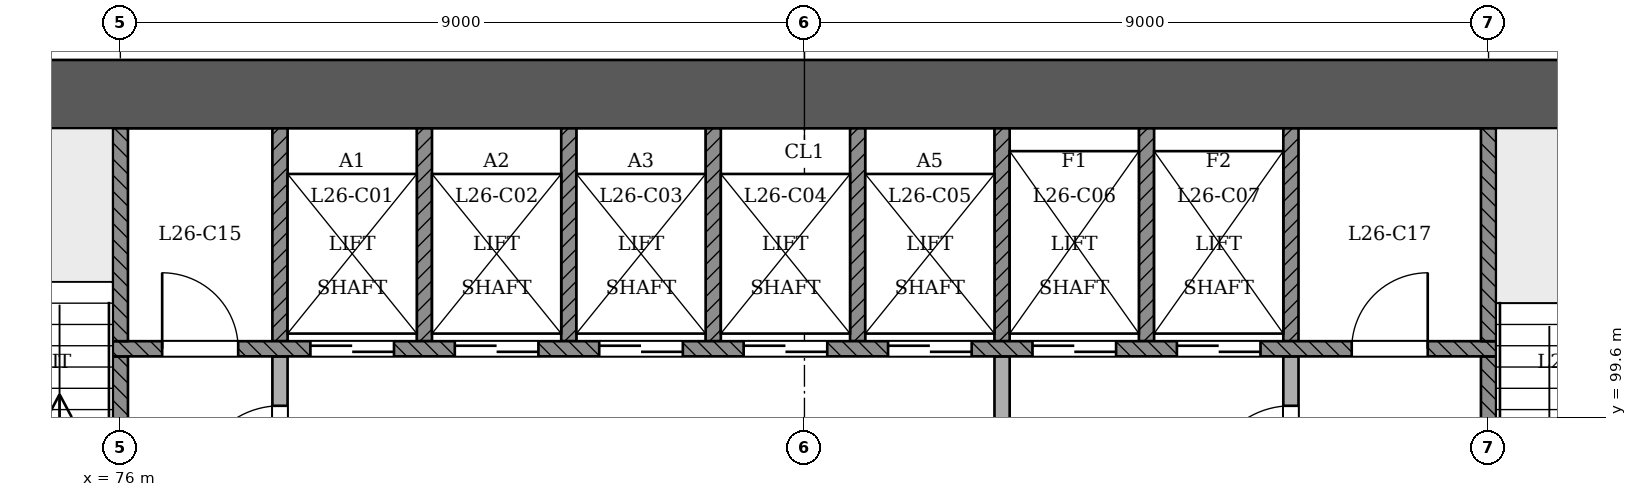
"""IFC4 building model, lengths in metres.
Left out: names, types, materials, properties, quantities, classifications, styles, units other than length and angle.
Written with IfcOpenShell. Run it as: python <this file> out.ifc"""

import sys

from ifc_helpers import new_model, si_unit, direction, frame, frame_2d, origin, place, context, subcontext, project, spatial, rectangle, extrude, element, fill, save


model = new_model("IFC4")
c1 = context("Model", 3, precision=1e-05, world=origin(), true_north=direction((0.0, 1.0)))
c2 = subcontext(c1, "Body", "Model", "MODEL_VIEW")
j1 = project(units=[si_unit("LENGTHUNIT", "METRE"), si_unit("PLANEANGLEUNIT", "RADIAN")], contexts=[c1])
p1 = place(None, origin())
s1 = spatial("IfcSite", under=j1, at=p1, CompositionType="ELEMENT")
p2 = place(p1, origin())
s2 = spatial("IfcBuilding", under=s1, at=p2, CompositionType="ELEMENT")
p3 = place(p2, frame((0.0, 0.0, 104.4)))
s3 = spatial("IfcBuildingStorey", under=s2, at=p3, CompositionType="ELEMENT", Elevation=104.4)
p4 = place(p3, frame((97.45, 103.85, 0.0), z_axis=(0.0, 0.0, 1.0), x_axis=(-1.0, 0.0, 0.0)))
e1 = element("IfcWall", 1, at=p4, inside=s3, PredefinedType="SHEAR", context=c2, shape_type="SweptSolid", body=[
    extrude(rectangle(XDim=25.35, YDim=0.9, at=frame_2d((12.675, 0.0))), origin(), (0.0, 0.0, 1.0), 3.6),
])
p5 = place(p3, frame((87.6, 93.4, 0.0), z_axis=(0.0, 0.0, 1.0), x_axis=(0.0, 1.0, 0.0)))
e2 = element("IfcWall", 2, at=p5, inside=s3, PredefinedType="PARTITIONING", context=c2, shape_type="SweptSolid", body=[
    extrude(rectangle(XDim=7.0, YDim=0.2, at=frame_2d((3.5, 0.0))), origin(), (0.0, 0.0, 1.0), 3.1),
])
p6 = place(p5, frame((4.45, 0.0, 0.0)))
e3 = element("IfcOpeningElement", 3, at=p6, cuts=e2, PredefinedType="OPENING", context=c2, shape_type="SweptSolid", body=[
    extrude(rectangle(XDim=1.1, YDim=2.1, at=frame_2d((0.55, 1.05))), frame((0.0, 0.11, 0.0), z_axis=(0.0, -1.0, 0.0), x_axis=(1.0, 0.0, 0.0)), (0.0, 0.0, 1.0), 0.221),
])
p7 = place(p3, frame((91.4, 96.2, 0.0), z_axis=(0.0, 0.0, 1.0), x_axis=(0.0, 1.0, 0.0)))
e4 = element("IfcWall", 4, at=p7, inside=s3, PredefinedType="PARTITIONING", context=c2, shape_type="SweptSolid", body=[
    extrude(rectangle(XDim=4.2, YDim=0.2, at=frame_2d((2.1, 0.0))), origin(), (0.0, 0.0, 1.0), 3.1),
])
p8 = place(p7, frame((2.45, 0.0, 0.0)))
e5 = element("IfcOpeningElement", 5, at=p8, cuts=e4, PredefinedType="OPENING", context=c2, shape_type="SweptSolid", body=[
    extrude(rectangle(XDim=1.1, YDim=2.1, at=frame_2d((0.55, 1.05))), frame((0.0, 0.11, 0.0), z_axis=(0.0, -1.0, 0.0), x_axis=(1.0, 0.0, 0.0)), (0.0, 0.0, 1.0), 0.221),
])
p9 = place(p3, frame((76.0, 96.7, 0.0), z_axis=(0.0, 0.0, 1.0), x_axis=(0.0, 1.0, 0.0)))
e6 = element("IfcWall", 6, at=p9, inside=s3, PredefinedType="SOLIDWALL", context=c2, shape_type="SweptSolid", body=[
    extrude(rectangle(XDim=3.7, YDim=0.2, at=frame_2d((1.85, 0.0))), origin(), (0.0, 0.0, 1.0), 3.1),
])
p10 = place(p9, frame((0.35, 0.0, 0.0)))
e7 = element("IfcOpeningElement", 7, at=p10, cuts=e6, PredefinedType="OPENING", context=c2, shape_type="SweptSolid", body=[
    extrude(rectangle(XDim=1.1, YDim=2.1, at=frame_2d((0.55, 1.05))), frame((0.0, 0.11, 0.0), z_axis=(0.0, -1.0, 0.0), x_axis=(1.0, 0.0, 0.0)), (0.0, 0.0, 1.0), 0.221),
])
p11 = place(p3, frame((78.1, 96.7, 0.0), z_axis=(0.0, 0.0, 1.0), x_axis=(0.0, 1.0, 0.0)))
e8 = element("IfcWall", 8, at=p11, inside=s3, PredefinedType="PARTITIONING", context=c2, shape_type="SweptSolid", body=[
    extrude(rectangle(XDim=3.7, YDim=0.2, at=frame_2d((1.85, 0.0))), origin(), (0.0, 0.0, 1.0), 3.1),
])
p12 = place(p11, frame((1.95, 0.0, 0.0)))
e9 = element("IfcOpeningElement", 9, at=p12, cuts=e8, PredefinedType="OPENING", context=c2, shape_type="SweptSolid", body=[
    extrude(rectangle(XDim=1.1, YDim=2.1, at=frame_2d((0.55, 1.05))), frame((0.0, 0.11, 0.0), z_axis=(0.0, -1.0, 0.0), x_axis=(1.0, 0.0, 0.0)), (0.0, 0.0, 1.0), 0.221),
])
p13 = place(p3, frame((94.0, 96.7, 0.0), z_axis=(0.0, 0.0, 1.0), x_axis=(0.0, 1.0, 0.0)))
e10 = element("IfcWall", 10, at=p13, inside=s3, PredefinedType="SOLIDWALL", context=c2, shape_type="SweptSolid", body=[
    extrude(rectangle(XDim=3.7, YDim=0.2, at=frame_2d((1.85, 0.0))), origin(), (0.0, 0.0, 1.0), 3.1),
])
p14 = place(p13, frame((0.35, 0.0, 0.0)))
e11 = element("IfcOpeningElement", 11, at=p14, cuts=e10, PredefinedType="OPENING", context=c2, shape_type="SweptSolid", body=[
    extrude(rectangle(XDim=1.1, YDim=2.1, at=frame_2d((0.55, 1.05))), frame((0.0, 0.11, 0.0), z_axis=(0.0, -1.0, 0.0), x_axis=(1.0, 0.0, 0.0)), (0.0, 0.0, 1.0), 0.221),
])
p15 = place(p3, frame((75.9, 100.5, 0.0), z_axis=(0.0, 0.0, 1.0), x_axis=(1.0, 0.0, 0.0)))
e12 = element("IfcWall", 12, at=p15, inside=s3, PredefinedType="SOLIDWALL", context=c2, shape_type="SweptSolid", body=[
    extrude(rectangle(XDim=18.2, YDim=0.2, at=frame_2d((9.1, 0.0))), origin(), (0.0, 0.0, 1.0), 3.1),
])
p16 = place(p15, frame((2.6, 0.0, 0.0)))
e13 = element("IfcOpeningElement", 13, at=p16, cuts=e12, PredefinedType="OPENING", context=c2, shape_type="SweptSolid", body=[
    extrude(rectangle(XDim=1.1, YDim=2.1, at=frame_2d((0.55, 1.05))), frame((0.0, 0.11, 0.0), z_axis=(0.0, -1.0, 0.0), x_axis=(1.0, 0.0, 0.0)), (0.0, 0.0, 1.0), 0.221),
])
p17 = place(p15, frame((4.5, 0.0, 0.0)))
e14 = element("IfcOpeningElement", 14, at=p17, cuts=e12, PredefinedType="OPENING", context=c2, shape_type="SweptSolid", body=[
    extrude(rectangle(XDim=1.1, YDim=2.1, at=frame_2d((0.55, 1.05))), frame((0.0, 0.11, 0.0), z_axis=(0.0, -1.0, 0.0), x_axis=(1.0, 0.0, 0.0)), (0.0, 0.0, 1.0), 0.221),
])
p18 = place(p15, frame((6.4, 0.0, 0.0)))
e15 = element("IfcOpeningElement", 15, at=p18, cuts=e12, PredefinedType="OPENING", context=c2, shape_type="SweptSolid", body=[
    extrude(rectangle(XDim=1.1, YDim=2.1, at=frame_2d((0.55, 1.05))), frame((0.0, 0.11, 0.0), z_axis=(0.0, -1.0, 0.0), x_axis=(1.0, 0.0, 0.0)), (0.0, 0.0, 1.0), 0.221),
])
p19 = place(p15, frame((8.3, 0.0, 0.0)))
e16 = element("IfcOpeningElement", 16, at=p19, cuts=e12, PredefinedType="OPENING", context=c2, shape_type="SweptSolid", body=[
    extrude(rectangle(XDim=1.1, YDim=2.1, at=frame_2d((0.55, 1.05))), frame((0.0, 0.11, 0.0), z_axis=(0.0, -1.0, 0.0), x_axis=(1.0, 0.0, 0.0)), (0.0, 0.0, 1.0), 0.221),
])
p20 = place(p15, frame((10.2, 0.0, 0.0)))
e17 = element("IfcOpeningElement", 17, at=p20, cuts=e12, PredefinedType="OPENING", context=c2, shape_type="SweptSolid", body=[
    extrude(rectangle(XDim=1.1, YDim=2.1, at=frame_2d((0.55, 1.05))), frame((0.0, 0.11, 0.0), z_axis=(0.0, -1.0, 0.0), x_axis=(1.0, 0.0, 0.0)), (0.0, 0.0, 1.0), 0.221),
])
p21 = place(p15, frame((12.1, 0.0, 0.0)))
e18 = element("IfcOpeningElement", 18, at=p21, cuts=e12, PredefinedType="OPENING", context=c2, shape_type="SweptSolid", body=[
    extrude(rectangle(XDim=1.1, YDim=2.1, at=frame_2d((0.55, 1.05))), frame((0.0, 0.11, 0.0), z_axis=(0.0, -1.0, 0.0), x_axis=(1.0, 0.0, 0.0)), (0.0, 0.0, 1.0), 0.221),
])
p22 = place(p15, frame((14.0, 0.0, 0.0)))
e19 = element("IfcOpeningElement", 19, at=p22, cuts=e12, PredefinedType="OPENING", context=c2, shape_type="SweptSolid", body=[
    extrude(rectangle(XDim=1.1, YDim=2.1, at=frame_2d((0.55, 1.05))), frame((0.0, 0.11, 0.0), z_axis=(0.0, -1.0, 0.0), x_axis=(1.0, 0.0, 0.0)), (0.0, 0.0, 1.0), 0.221),
])
p23 = place(p15, frame((0.65, 0.0, 0.0)))
e20 = element("IfcOpeningElement", 20, at=p23, cuts=e12, PredefinedType="OPENING", context=c2, shape_type="SweptSolid", body=[
    extrude(rectangle(XDim=1.0, YDim=2.1, at=frame_2d((0.5, 1.05))), frame((0.0, 0.11, 0.0), z_axis=(0.0, -1.0, 0.0), x_axis=(1.0, 0.0, 0.0)), (0.0, 0.0, 1.0), 0.221),
])
p24 = place(p15, frame((16.3, 0.0, 0.0)))
e21 = element("IfcOpeningElement", 21, at=p24, cuts=e12, PredefinedType="OPENING", context=c2, shape_type="SweptSolid", body=[
    extrude(rectangle(XDim=1.0, YDim=2.1, at=frame_2d((0.5, 1.05))), frame((0.0, 0.11, 0.0), z_axis=(0.0, -1.0, 0.0), x_axis=(1.0, 0.0, 0.0)), (0.0, 0.0, 1.0), 0.221),
])
for number, where, z_axis, x_axis in (
    (22, (76.0, 100.6, 0.0), (0.0, 0.0, 1.0), (0.0, 1.0, 0.0)),
    (23, (78.1, 100.6, 0.0), (0.0, 0.0, 1.0), (0.0, 1.0, 0.0)),
    (24, (80.0, 100.6, 0.0), (0.0, 0.0, 1.0), (0.0, 1.0, 0.0)),
    (25, (81.9, 100.6, 0.0), (0.0, 0.0, 1.0), (0.0, 1.0, 0.0)),
    (26, (83.8, 100.6, 0.0), (0.0, 0.0, 1.0), (0.0, 1.0, 0.0)),
    (27, (85.7, 100.6, 0.0), (0.0, 0.0, 1.0), (0.0, 1.0, 0.0)),
    (28, (87.6, 100.6, 0.0), (0.0, 0.0, 1.0), (0.0, 1.0, 0.0)),
    (29, (89.5, 100.6, 0.0), (0.0, 0.0, 1.0), (0.0, 1.0, 0.0)),
    (30, (91.4, 100.6, 0.0), (0.0, 0.0, 1.0), (0.0, 1.0, 0.0)),
    (31, (94.0, 100.6, 0.0), (0.0, 0.0, 1.0), (0.0, 1.0, 0.0)),
):
    element("IfcWall", number, at=place(p3, frame(where, z_axis=z_axis, x_axis=x_axis)), inside=s3, PredefinedType="SOLIDWALL", context=c2, shape_type="SweptSolid", body=[
        extrude(rectangle(XDim=2.8, YDim=0.2, at=frame_2d((1.4, 0.0))), origin(), (0.0, 0.0, 1.0), 3.1),
    ])
p25 = place(p16, origin())
e32 = element("IfcDoor", 32, at=p25, inside=s3, OperationType="SLIDING_TO_RIGHT", PredefinedType="NOTDEFINED", context=c2, shape_type="SweptSolid", body=[
    extrude(rectangle(XDim=1.1, YDim=2.1, at=frame_2d((0.55, 1.05))), frame((0.0, 0.025, 0.0), z_axis=(0.0, -1.0, 0.0), x_axis=(1.0, 0.0, 0.0)), (0.0, 0.0, 1.0), 0.05),
])
fill(e13, e32)
p26 = place(p17, origin())
e33 = element("IfcDoor", 33, at=p26, inside=s3, OperationType="SLIDING_TO_LEFT", PredefinedType="NOTDEFINED", context=c2, shape_type="SweptSolid", body=[
    extrude(rectangle(XDim=1.1, YDim=2.1, at=frame_2d((0.55, 1.05))), frame((0.0, 0.025, 0.0), z_axis=(0.0, -1.0, 0.0), x_axis=(1.0, 0.0, 0.0)), (0.0, 0.0, 1.0), 0.05),
])
fill(e14, e33)
p27 = place(p18, origin())
e34 = element("IfcDoor", 34, at=p27, inside=s3, OperationType="SLIDING_TO_RIGHT", PredefinedType="NOTDEFINED", context=c2, shape_type="SweptSolid", body=[
    extrude(rectangle(XDim=1.1, YDim=2.1, at=frame_2d((0.55, 1.05))), frame((0.0, 0.025, 0.0), z_axis=(0.0, -1.0, 0.0), x_axis=(1.0, 0.0, 0.0)), (0.0, 0.0, 1.0), 0.05),
])
fill(e15, e34)
p28 = place(p19, origin())
e35 = element("IfcDoor", 35, at=p28, inside=s3, OperationType="SLIDING_TO_LEFT", PredefinedType="NOTDEFINED", context=c2, shape_type="SweptSolid", body=[
    extrude(rectangle(XDim=1.1, YDim=2.1, at=frame_2d((0.55, 1.05))), frame((0.0, 0.025, 0.0), z_axis=(0.0, -1.0, 0.0), x_axis=(1.0, 0.0, 0.0)), (0.0, 0.0, 1.0), 0.05),
])
fill(e16, e35)
p29 = place(p20, origin())
e36 = element("IfcDoor", 36, at=p29, inside=s3, OperationType="SLIDING_TO_RIGHT", PredefinedType="NOTDEFINED", context=c2, shape_type="SweptSolid", body=[
    extrude(rectangle(XDim=1.1, YDim=2.1, at=frame_2d((0.55, 1.05))), frame((0.0, 0.025, 0.0), z_axis=(0.0, -1.0, 0.0), x_axis=(1.0, 0.0, 0.0)), (0.0, 0.0, 1.0), 0.05),
])
fill(e17, e36)
p30 = place(p21, origin())
e37 = element("IfcDoor", 37, at=p30, inside=s3, OperationType="SLIDING_TO_RIGHT", PredefinedType="NOTDEFINED", context=c2, shape_type="SweptSolid", body=[
    extrude(rectangle(XDim=1.1, YDim=2.1, at=frame_2d((0.55, 1.05))), frame((0.0, 0.025, 0.0), z_axis=(0.0, -1.0, 0.0), x_axis=(1.0, 0.0, 0.0)), (0.0, 0.0, 1.0), 0.05),
])
fill(e18, e37)
p31 = place(p22, origin())
e38 = element("IfcDoor", 38, at=p31, inside=s3, OperationType="SLIDING_TO_LEFT", PredefinedType="NOTDEFINED", context=c2, shape_type="SweptSolid", body=[
    extrude(rectangle(XDim=1.1, YDim=2.1, at=frame_2d((0.55, 1.05))), frame((0.0, 0.025, 0.0), z_axis=(0.0, -1.0, 0.0), x_axis=(1.0, 0.0, 0.0)), (0.0, 0.0, 1.0), 0.05),
])
fill(e19, e38)
p32 = place(p12, origin())
e39 = element("IfcDoor", 39, at=p32, inside=s3, OperationType="SINGLE_SWING_LEFT", PredefinedType="NOTDEFINED", context=c2, shape_type="SweptSolid", body=[
    extrude(rectangle(XDim=1.1, YDim=2.1, at=frame_2d((0.55, 1.05))), frame((0.0, 0.025, 0.0), z_axis=(0.0, -1.0, 0.0), x_axis=(1.0, 0.0, 0.0)), (0.0, 0.0, 1.0), 0.05),
])
fill(e9, e39)
p33 = place(p8, origin())
e40 = element("IfcDoor", 40, at=p33, inside=s3, OperationType="SINGLE_SWING_LEFT", PredefinedType="NOTDEFINED", context=c2, shape_type="SweptSolid", body=[
    extrude(rectangle(XDim=1.1, YDim=2.1, at=frame_2d((0.55, 1.05))), frame((0.0, 0.025, 0.0), z_axis=(0.0, -1.0, 0.0), x_axis=(1.0, 0.0, 0.0)), (0.0, 0.0, 1.0), 0.05),
])
fill(e5, e40)
p34 = place(p23, origin())
e41 = element("IfcDoor", 41, at=p34, inside=s3, OperationType="SINGLE_SWING_LEFT", PredefinedType="NOTDEFINED", context=c2, shape_type="SweptSolid", body=[
    extrude(rectangle(XDim=1.0, YDim=2.1, at=frame_2d((0.5, 1.05))), frame((0.0, 0.025, 0.0), z_axis=(0.0, -1.0, 0.0), x_axis=(1.0, 0.0, 0.0)), (0.0, 0.0, 1.0), 0.05),
])
fill(e20, e41)
p35 = place(p24, origin())
e42 = element("IfcDoor", 42, at=p35, inside=s3, OperationType="SINGLE_SWING_RIGHT", PredefinedType="NOTDEFINED", context=c2, shape_type="SweptSolid", body=[
    extrude(rectangle(XDim=1.0, YDim=2.1, at=frame_2d((0.5, 1.05))), frame((0.0, 0.025, 0.0), z_axis=(0.0, -1.0, 0.0), x_axis=(1.0, 0.0, 0.0)), (0.0, 0.0, 1.0), 0.05),
])
fill(e21, e42)
save(model, sys.argv[1])
